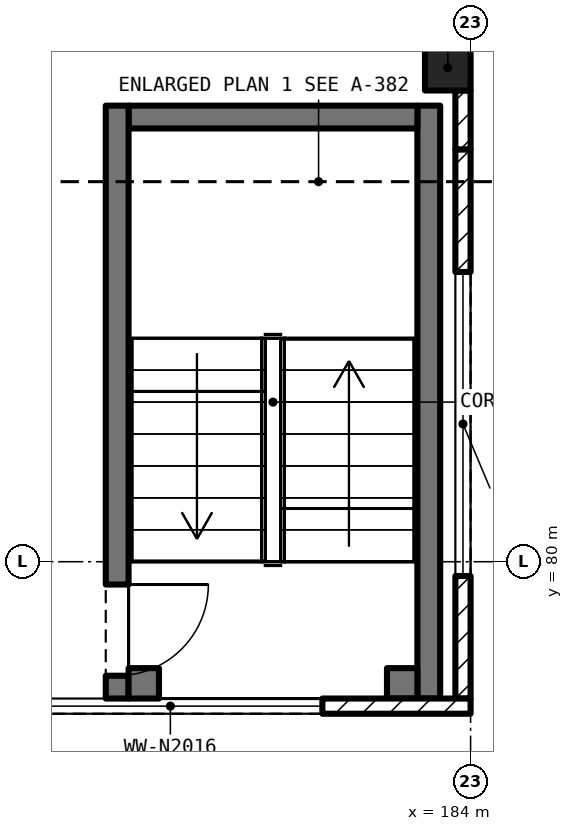
"""IFC4 building model, lengths in metres.
Left out: names, types, materials, properties, quantities, classifications, styles, units other than length and angle.
Written with IfcOpenShell. Run it as: python <this file> out.ifc"""

import sys

from ifc_helpers import new_model, si_unit, direction, frame, frame_2d, origin, origin_2d, place, context, subcontext, project, spatial, rectangle, extrude, element, fill, save


model = new_model("IFC4")
c1 = context("Model", 3, precision=1e-05, world=origin(), true_north=direction((0.0, 1.0)))
c2 = subcontext(c1, "Body", "Model", "MODEL_VIEW")
j1 = project(units=[si_unit("LENGTHUNIT", "METRE"), si_unit("PLANEANGLEUNIT", "RADIAN")], contexts=[c1])
p1 = place(None, origin())
s1 = spatial("IfcSite", under=j1, at=p1, CompositionType="ELEMENT")
p2 = place(p1, origin())
s2 = spatial("IfcBuilding", under=s1, at=p2, CompositionType="ELEMENT")
p3 = place(p2, frame((0.0, 0.0, 6.0)))
s3 = spatial("IfcBuildingStorey", under=s2, at=p3, CompositionType="ELEMENT", Elevation=6.0)
p4 = place(p3, frame((183.7, 86.5, 0.0), z_axis=(0.0, 0.0, 1.0), x_axis=(1.0, 0.0, 0.0)))
e1 = element("IfcColumn", 1, at=p4, inside=s3, PredefinedType="COLUMN", context=c2, shape_type="SweptSolid", body=[
    extrude(rectangle(XDim=0.6, YDim=0.6, at=origin_2d()), origin(), (0.0, 0.0, 1.0), 5.5),
])
p5 = place(p3, frame((183.9, 78.2, 0.0), z_axis=(0.0, 0.0, 1.0), x_axis=(0.0, 1.0, 0.0)))
e2 = element("IfcWall", 2, at=p5, inside=s3, PredefinedType="SOLIDWALL", context=c2, shape_type="SweptSolid", body=[
    extrude(rectangle(XDim=7.225, YDim=0.2, at=frame_2d((3.613, 0.0))), origin(), (0.0, 0.0, 1.0), 4.55),
])
p6 = place(p5, frame((1.612, 0.0, 1.0)))
e3 = element("IfcOpeningElement", 3, at=p6, cuts=e2, PredefinedType="OPENING", context=c2, shape_type="SweptSolid", body=[
    extrude(rectangle(XDim=4.0, YDim=1.8, at=frame_2d((2.0, 0.9))), frame((0.0, 0.112, 0.0), z_axis=(0.0, -1.0, 0.0), x_axis=(1.0, 0.0, 0.0)), (0.0, 0.0, 1.0), 0.224),
])
p7 = place(p3, frame((183.9, 85.425, 0.0), z_axis=(0.0, 0.0, 1.0), x_axis=(0.0, 1.0, 0.0)))
e4 = element("IfcWall", 4, at=p7, inside=s3, PredefinedType="SOLIDWALL", context=c2, shape_type="SweptSolid", body=[
    extrude(rectangle(XDim=0.775, YDim=0.2, at=frame_2d((0.387, 0.0))), origin(), (0.0, 0.0, 1.0), 4.55),
])
p8 = place(p3, frame((176.1, 78.1, 0.0), z_axis=(0.0, 0.0, 1.0), x_axis=(1.0, 0.0, 0.0)))
e5 = element("IfcWall", 5, at=p8, inside=s3, PredefinedType="SOLIDWALL", context=c2, shape_type="SweptSolid", body=[
    extrude(rectangle(XDim=7.9, YDim=0.2, at=frame_2d((3.95, 0.0))), origin(), (0.0, 0.0, 1.0), 4.55),
])
p9 = place(p8, frame((1.95, 0.0, 1.0)))
e6 = element("IfcOpeningElement", 6, at=p9, cuts=e5, PredefinedType="OPENING", context=c2, shape_type="SweptSolid", body=[
    extrude(rectangle(XDim=4.0, YDim=1.8, at=frame_2d((2.0, 0.9))), frame((0.0, 0.112, 0.0), z_axis=(0.0, -1.0, 0.0), x_axis=(1.0, 0.0, 0.0)), (0.0, 0.0, 1.0), 0.224),
])
p10 = place(p3, frame((183.45, 78.2, 0.0), z_axis=(0.0, 0.0, 1.0), x_axis=(0.0, 1.0, 0.0)))
e7 = element("IfcWall", 7, at=p10, inside=s3, PredefinedType="SOLIDWALL", context=c2, shape_type="SweptSolid", body=[
    extrude(rectangle(XDim=7.8, YDim=0.3, at=frame_2d((3.9, 0.0))), origin(), (0.0, 0.0, 1.0), 5.5),
])
p11 = place(p3, frame((183.3, 85.85, 0.0), z_axis=(0.0, 0.0, 1.0), x_axis=(-1.0, 0.0, 0.0)))
e8 = element("IfcWall", 8, at=p11, inside=s3, PredefinedType="SOLIDWALL", context=c2, shape_type="SweptSolid", body=[
    extrude(rectangle(XDim=3.8, YDim=0.3, at=frame_2d((1.9, 0.0))), origin(), (0.0, 0.0, 1.0), 5.5),
])
p12 = place(p3, frame((179.35, 86.0, 0.0), z_axis=(0.0, 0.0, 1.0), x_axis=(0.0, -1.0, 0.0)))
e9 = element("IfcWall", 9, at=p12, inside=s3, PredefinedType="SOLIDWALL", context=c2, shape_type="SweptSolid", body=[
    extrude(rectangle(XDim=7.8, YDim=0.3, at=frame_2d((3.9, 0.0))), origin(), (0.0, 0.0, 1.0), 5.5),
])
p13 = place(p12, frame((6.3, 0.0, 0.0)))
e10 = element("IfcOpeningElement", 10, at=p13, cuts=e9, PredefinedType="OPENING", context=c2, shape_type="SweptSolid", body=[
    extrude(rectangle(XDim=1.2, YDim=2.1, at=frame_2d((0.6, 1.05))), frame((0.0, 0.162, 0.0), z_axis=(0.0, -1.0, 0.0), x_axis=(1.0, 0.0, 0.0)), (0.0, 0.0, 1.0), 0.324),
])
p14 = place(p3, frame((179.5, 78.4, 0.0), z_axis=(0.0, 0.0, 1.0), x_axis=(1.0, 0.0, 0.0)))
e11 = element("IfcWall", 11, at=p14, inside=s3, PredefinedType="SOLIDWALL", context=c2, shape_type="SweptSolid", body=[
    extrude(rectangle(XDim=0.4, YDim=0.4, at=frame_2d((0.2, 0.0))), origin(), (0.0, 0.0, 1.0), 5.5),
])
p15 = place(p3, frame((182.9, 78.4, 0.0), z_axis=(0.0, 0.0, 1.0), x_axis=(1.0, 0.0, 0.0)))
e12 = element("IfcWall", 12, at=p15, inside=s3, PredefinedType="SOLIDWALL", context=c2, shape_type="SweptSolid", body=[
    extrude(rectangle(XDim=0.4, YDim=0.4, at=frame_2d((0.2, 0.0))), origin(), (0.0, 0.0, 1.0), 5.5),
])
p16 = place(p6, origin())
e13 = element("IfcWindow", 13, at=p16, inside=s3, PartitioningType="DOUBLE_PANEL_VERTICAL", PredefinedType="WINDOW", context=c2, shape_type="SweptSolid", body=[
    extrude(rectangle(XDim=4.0, YDim=1.8, at=frame_2d((2.0, 0.9))), frame((0.0, 0.03, 0.0), z_axis=(0.0, -1.0, 0.0), x_axis=(1.0, 0.0, 0.0)), (0.0, 0.0, 1.0), 0.06),
])
fill(e3, e13)
p17 = place(p9, origin())
e14 = element("IfcWindow", 14, at=p17, inside=s3, PartitioningType="DOUBLE_PANEL_VERTICAL", PredefinedType="WINDOW", context=c2, shape_type="SweptSolid", body=[
    extrude(rectangle(XDim=4.0, YDim=1.8, at=frame_2d((2.0, 0.9))), frame((0.0, 0.03, 0.0), z_axis=(0.0, -1.0, 0.0), x_axis=(1.0, 0.0, 0.0)), (0.0, 0.0, 1.0), 0.06),
])
fill(e6, e14)
p18 = place(p13, origin())
e15 = element("IfcDoor", 15, at=p18, inside=s3, OperationType="SINGLE_SWING_LEFT", PredefinedType="DOOR", context=c2, shape_type="SweptSolid", body=[
    extrude(rectangle(XDim=1.2, YDim=2.1, at=frame_2d((0.6, 1.05))), frame((0.0, 0.025, 0.0), z_axis=(0.0, -1.0, 0.0), x_axis=(1.0, 0.0, 0.0)), (0.0, 0.0, 1.0), 0.05),
])
fill(e10, e15)
save(model, sys.argv[1])
